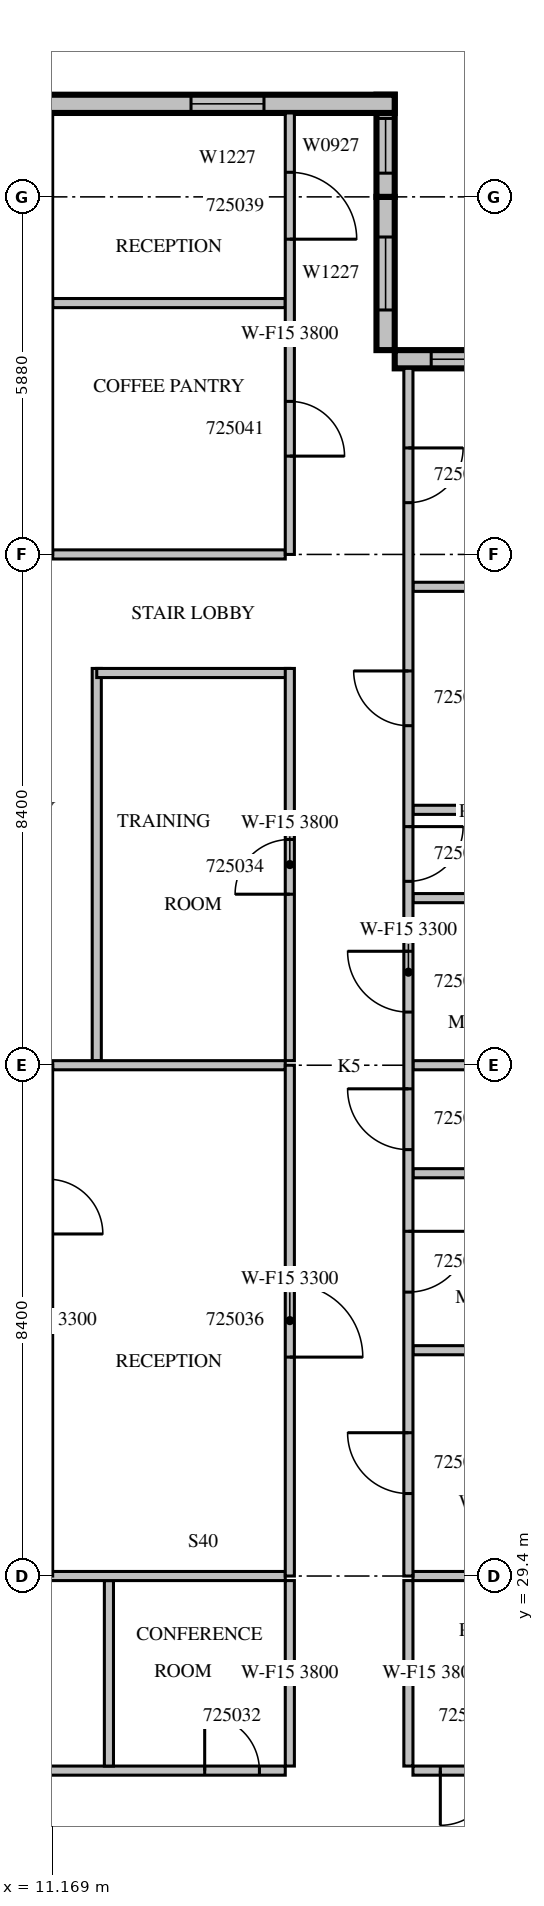
"""IFC4 building model, lengths in metres.
Left out: names, types, materials, properties, quantities, classifications, styles, units other than length and angle.
Written with IfcOpenShell. Run it as: python <this file> out.ifc"""

import sys

from ifc_helpers import new_model, si_unit, direction, frame, frame_2d, origin, place, context, subcontext, project, spatial, rectangle, extrude, source, transform, mapped, element, fill, save


model = new_model("IFC4")
c1 = context("Model", 3, precision=1e-05, world=origin(), true_north=direction((0.0, 1.0)))
c2 = subcontext(c1, "Body", "Model", "MODEL_VIEW")
j1 = project(units=[si_unit("LENGTHUNIT", "METRE"), si_unit("PLANEANGLEUNIT", "RADIAN")], contexts=[c1])
p1 = place(None, origin())
s1 = spatial("IfcSite", under=j1, at=p1, CompositionType="ELEMENT")
p2 = place(p1, origin())
s2 = spatial("IfcBuilding", under=s1, at=p2, CompositionType="ELEMENT")
p3 = place(p2, frame((0.0, 0.0, 116.1)))
s3 = spatial("IfcBuildingStorey", under=s2, at=p3, CompositionType="ELEMENT", Elevation=116.1)
m1 = source(origin(), c2, "Body", "SweptSolid", [
    extrude(rectangle(XDim=4.2, YDim=0.3, at=frame_2d((2.1, 0.0))), origin(), (0.0, 0.0, 1.0), 3.8),
])
p4 = place(p3, frame((21.0, 49.41, 0.0), z_axis=(0.0, 0.0, 1.0), x_axis=(-1.0, 0.0, 0.0)))
e1 = element("IfcWall", 1, at=p4, inside=s3, PredefinedType="STANDARD", context=c2, shape_type="MappedRepresentation", body=[
    mapped(m1, transform((0.0, 0.0, 0.0), scale=1.0)),
])
m2 = source(origin(), c2, "Body", "SweptSolid", [
    extrude(rectangle(XDim=3.0, YDim=2.7, at=frame_2d((1.5, 1.35))), frame((0.0, 0.16, 0.0), z_axis=(0.0, -1.0, 0.0), x_axis=(1.0, 0.0, 0.0)), (0.0, 0.0, 1.0), 0.32),
])
p5 = place(p4, frame((0.6, 0.0, 0.6)))
e2 = element("IfcOpeningElement", 2, at=p5, cuts=e1, PredefinedType="OPENING", context=c2, shape_type="MappedRepresentation", body=[
    mapped(m2, transform((0.0, 0.0, 0.0), scale=1.0)),
])
m3 = source(origin(), c2, "Body", "SweptSolid", [
    extrude(rectangle(XDim=2.52, YDim=0.3, at=frame_2d((1.26, 0.0))), origin(), (0.0, 0.0, 1.0), 3.8),
])
p6 = place(p3, frame((16.65, 49.56, 0.0), z_axis=(0.0, 0.0, 1.0), x_axis=(0.0, 1.0, 0.0)))
e3 = element("IfcWall", 3, at=p6, inside=s3, PredefinedType="STANDARD", context=c2, shape_type="MappedRepresentation", body=[
    mapped(m3, transform((0.0, 0.0, 0.0), scale=1.0)),
])
m4 = source(origin(), c2, "Body", "SweptSolid", [
    extrude(rectangle(XDim=1.2, YDim=2.7, at=frame_2d((0.6, 1.35))), frame((0.0, 0.16, 0.0), z_axis=(0.0, -1.0, 0.0), x_axis=(1.0, 0.0, 0.0)), (0.0, 0.0, 1.0), 0.32),
])
p7 = place(p6, frame((0.66, 0.0, 0.6)))
e4 = element("IfcOpeningElement", 4, at=p7, cuts=e3, PredefinedType="OPENING", context=c2, shape_type="MappedRepresentation", body=[
    mapped(m4, transform((0.0, 0.0, 0.0), scale=1.0)),
])
m5 = source(origin(), c2, "Body", "SweptSolid", [
    extrude(rectangle(XDim=1.68, YDim=0.3, at=frame_2d((0.84, 0.0))), origin(), (0.0, 0.0, 1.0), 3.8),
])
p8 = place(p3, frame((16.65, 52.08, 0.0), z_axis=(0.0, 0.0, 1.0), x_axis=(0.0, 1.0, 0.0)))
e5 = element("IfcWall", 5, at=p8, inside=s3, PredefinedType="STANDARD", context=c2, shape_type="MappedRepresentation", body=[
    mapped(m5, transform((0.0, 0.0, 0.0), scale=1.0)),
])
m6 = source(origin(), c2, "Body", "SweptSolid", [
    extrude(rectangle(XDim=0.9, YDim=2.7, at=frame_2d((0.45, 1.35))), frame((0.0, 0.16, 0.0), z_axis=(0.0, -1.0, 0.0), x_axis=(1.0, 0.0, 0.0)), (0.0, 0.0, 1.0), 0.32),
])
p9 = place(p8, frame((0.39, 0.0, 0.6)))
e6 = element("IfcOpeningElement", 6, at=p9, cuts=e5, PredefinedType="OPENING", context=c2, shape_type="MappedRepresentation", body=[
    mapped(m6, transform((0.0, 0.0, 0.0), scale=1.0)),
])
m7 = source(origin(), c2, "Body", "SweptSolid", [
    extrude(rectangle(XDim=10.5, YDim=0.3, at=frame_2d((5.25, 0.0))), origin(), (0.0, 0.0, 1.0), 3.8),
])
p10 = place(p3, frame((16.8, 53.61, 0.0), z_axis=(0.0, 0.0, 1.0), x_axis=(-1.0, 0.0, 0.0)))
e7 = element("IfcWall", 7, at=p10, inside=s3, PredefinedType="STANDARD", context=c2, shape_type="MappedRepresentation", body=[
    mapped(m7, transform((0.0, 0.0, 0.0), scale=1.0)),
])
p11 = place(p10, frame((2.15, 0.0, 0.6)))
e8 = element("IfcOpeningElement", 8, at=p11, cuts=e7, PredefinedType="OPENING", context=c2, shape_type="MappedRepresentation", body=[
    mapped(m4, transform((0.0, 0.0, 0.0), scale=1.0)),
])
m8 = source(origin(), c2, "Body", "SweptSolid", [
    extrude(rectangle(XDim=1.8, YDim=2.7, at=frame_2d((0.9, 1.35))), frame((0.0, 0.16, 0.0), z_axis=(0.0, -1.0, 0.0), x_axis=(1.0, 0.0, 0.0)), (0.0, 0.0, 1.0), 0.32),
])
p12 = place(p10, frame((8.025, 0.0, 0.6)))
e9 = element("IfcOpeningElement", 9, at=p12, cuts=e7, PredefinedType="OPENING", context=c2, shape_type="MappedRepresentation", body=[
    mapped(m8, transform((0.0, 0.0, 0.0), scale=1.0)),
])
m9 = source(origin(), c2, "Body", "SweptSolid", [
    extrude(rectangle(XDim=8.495, YDim=0.15, at=frame_2d((4.247, 0.0))), origin(), (0.0, 0.0, 1.0), 3.8),
])
p13 = place(p3, frame((6.505, 26.2, 0.0), z_axis=(0.0, 0.0, 1.0), x_axis=(1.0, 0.0, 0.0)))
e10 = element("IfcWall", 10, at=p13, inside=s3, PredefinedType="PARTITIONING", context=c2, shape_type="MappedRepresentation", body=[
    mapped(m9, transform((0.0, 0.0, 0.0), scale=1.0)),
])
m10 = source(origin(), c2, "Body", "SweptSolid", [
    extrude(rectangle(XDim=0.9, YDim=2.1, at=frame_2d((0.45, 1.05))), frame((0.0, 0.085, 0.0), z_axis=(0.0, -1.0, 0.0), x_axis=(1.0, 0.0, 0.0)), (0.0, 0.0, 1.0), 0.17),
])
p14 = place(p13, frame((2.095, 0.0, 0.0)))
e11 = element("IfcOpeningElement", 11, at=p14, cuts=e10, PredefinedType="OPENING", context=c2, shape_type="MappedRepresentation", body=[
    mapped(m10, transform((0.0, 0.0, 0.0), scale=1.0)),
])
p15 = place(p13, frame((7.17, 0.0, 0.0)))
e12 = element("IfcOpeningElement", 12, at=p15, cuts=e10, PredefinedType="OPENING", context=c2, shape_type="MappedRepresentation", body=[
    mapped(m10, transform((0.0, 0.0, 0.0), scale=1.0)),
])
m11 = source(origin(), c2, "Body", "SweptSolid", [
    extrude(rectangle(XDim=3.6, YDim=0.15, at=frame_2d((1.8, 0.0))), origin(), (0.0, 0.0, 1.0), 3.8),
])
p16 = place(p3, frame((17.1, 26.2, 0.0), z_axis=(0.0, 0.0, 1.0), x_axis=(1.0, 0.0, 0.0)))
e13 = element("IfcWall", 13, at=p16, inside=s3, PredefinedType="PARTITIONING", context=c2, shape_type="MappedRepresentation", body=[
    mapped(m11, transform((0.0, 0.0, 0.0), scale=1.0)),
])
p17 = place(p16, frame((0.45, 0.0, 0.0)))
e14 = element("IfcOpeningElement", 14, at=p17, cuts=e13, PredefinedType="OPENING", context=c2, shape_type="MappedRepresentation", body=[
    mapped(m10, transform((0.0, 0.0, 0.0), scale=1.0)),
])
m12 = source(origin(), c2, "Body", "SweptSolid", [
    extrude(rectangle(XDim=3.05, YDim=0.15, at=frame_2d((1.525, 0.0))), origin(), (0.0, 0.0, 1.0), 3.8),
])
for number, where, z_axis, x_axis in (
    (15, (12.1, 26.275, 0.0), (0.0, 0.0, 1.0), (0.0, 1.0, 0.0)),
    (16, (15.075, 26.275, 0.0), (0.0, 0.0, 1.0), (0.0, 1.0, 0.0)),
    (17, (17.025, 29.325, 0.0), (0.0, 0.0, 1.0), (0.0, -1.0, 0.0)),
):
    element("IfcWall", number, at=place(p3, frame(where, z_axis=z_axis, x_axis=x_axis)), inside=s3, PredefinedType="PARTITIONING", context=c2, shape_type="MappedRepresentation", body=[
        mapped(m12, transform((0.0, 0.0, 0.0), scale=1.0)),
    ])
m13 = source(origin(), c2, "Body", "SweptSolid", [
    extrude(rectangle(XDim=3.976, YDim=0.15, at=frame_2d((1.988, 0.0))), origin(), (0.0, 0.0, 1.0), 3.8),
])
p18 = place(p3, frame((15.0, 29.4, 0.0), z_axis=(0.0, 0.0, 1.0), x_axis=(-1.0, 0.0, 0.0)))
e18 = element("IfcWall", 18, at=p18, inside=s3, PredefinedType="PARTITIONING", context=c2, shape_type="MappedRepresentation", body=[
    mapped(m13, transform((0.0, 0.0, 0.0), scale=1.0)),
])
m14 = source(origin(), c2, "Body", "SweptSolid", [
    extrude(rectangle(XDim=2.851, YDim=0.15, at=frame_2d((1.425, 0.0))), origin(), (0.0, 0.0, 1.0), 3.8),
])
p19 = place(p3, frame((19.951, 29.4, 0.0), z_axis=(0.0, 0.0, 1.0), x_axis=(-1.0, 0.0, 0.0)))
e19 = element("IfcWall", 19, at=p19, inside=s3, PredefinedType="PARTITIONING", context=c2, shape_type="MappedRepresentation", body=[
    mapped(m14, transform((0.0, 0.0, 0.0), scale=1.0)),
])
m15 = source(origin(), c2, "Body", "SweptSolid", [
    extrude(rectangle(XDim=6.45, YDim=0.15, at=frame_2d((3.225, 0.0))), origin(), (0.0, 0.0, 1.0), 3.8),
])
p20 = place(p3, frame((11.9, 44.325, 0.0), z_axis=(0.0, 0.0, 1.0), x_axis=(0.0, -1.0, 0.0)))
e20 = element("IfcWall", 20, at=p20, inside=s3, PredefinedType="PARTITIONING", context=c2, shape_type="MappedRepresentation", body=[
    mapped(m15, transform((0.0, 0.0, 0.0), scale=1.0)),
])
m16 = source(origin(), c2, "Body", "SweptSolid", [
    extrude(rectangle(XDim=3.175, YDim=0.15, at=frame_2d((1.587, 0.0))), origin(), (0.0, 0.0, 1.0), 3.8),
])
p21 = place(p3, frame((15.075, 44.25, 0.0), z_axis=(0.0, 0.0, 1.0), x_axis=(-1.0, 0.0, 0.0)))
e21 = element("IfcWall", 21, at=p21, inside=s3, PredefinedType="PARTITIONING", context=c2, shape_type="MappedRepresentation", body=[
    mapped(m16, transform((0.0, 0.0, 0.0), scale=1.0)),
])
p22 = place(p3, frame((15.075, 37.875, 0.0), z_axis=(0.0, 0.0, 1.0), x_axis=(0.0, 1.0, 0.0)))
e22 = element("IfcWall", 22, at=p22, inside=s3, PredefinedType="PARTITIONING", context=c2, shape_type="MappedRepresentation", body=[
    mapped(m15, transform((0.0, 0.0, 0.0), scale=1.0)),
])
p23 = place(p22, frame((2.737, 0.0, 0.0)))
e23 = element("IfcOpeningElement", 23, at=p23, cuts=e22, PredefinedType="OPENING", context=c2, shape_type="MappedRepresentation", body=[
    mapped(m10, transform((0.0, 0.0, 0.0), scale=1.0)),
])
m17 = source(origin(), c2, "Body", "SweptSolid", [
    extrude(rectangle(XDim=3.825, YDim=0.15, at=frame_2d((1.913, 0.0))), origin(), (0.0, 0.0, 1.0), 3.8),
])
for number, where, z_axis, x_axis in (
    (24, (15.0, 37.8, 0.0), (0.0, 0.0, 1.0), (-1.0, 0.0, 0.0)),
    (25, (15.0, 50.334, 0.0), (0.0, 0.0, 1.0), (-1.0, 0.0, 0.0)),
    (26, (15.0, 46.2, 0.0), (0.0, 0.0, 1.0), (-1.0, 0.0, 0.0)),
):
    element("IfcWall", number, at=place(p3, frame(where, z_axis=z_axis, x_axis=x_axis)), inside=s3, PredefinedType="PARTITIONING", context=c2, shape_type="MappedRepresentation", body=[
        mapped(m17, transform((0.0, 0.0, 0.0), scale=1.0)),
    ])
m18 = source(origin(), c2, "Body", "SweptSolid", [
    extrude(rectangle(XDim=3.6, YDim=0.15, at=frame_2d((1.8, 0.0))), origin(), (0.0, 0.0, 1.0), 2.8),
])
for number, where, z_axis, x_axis in (
    (27, (17.1, 33.113, 0.0), (0.0, 0.0, 1.0), (1.0, 0.0, 0.0)),
    (28, (17.1, 36.024, 0.0), (0.0, 0.0, 1.0), (1.0, 0.0, 0.0)),
):
    element("IfcWall", number, at=place(p3, frame(where, z_axis=z_axis, x_axis=x_axis)), inside=s3, PredefinedType="PARTITIONING", context=c2, shape_type="MappedRepresentation", body=[
        mapped(m18, transform((0.0, 0.0, 0.0), scale=1.0)),
    ])
for number, where, z_axis, x_axis in (
    (29, (17.1, 40.548, 0.0), (0.0, 0.0, 1.0), (1.0, 0.0, 0.0)),
    (30, (17.1, 45.667, 0.0), (0.0, 0.0, 1.0), (1.0, 0.0, 0.0)),
):
    element("IfcWall", number, at=place(p3, frame(where, z_axis=z_axis, x_axis=x_axis)), inside=s3, PredefinedType="PARTITIONING", context=c2, shape_type="MappedRepresentation", body=[
        mapped(m11, transform((0.0, 0.0, 0.0), scale=1.0)),
    ])
p24 = place(p3, frame((19.951, 37.8, 0.0), z_axis=(0.0, 0.0, 1.0), x_axis=(-1.0, 0.0, 0.0)))
e31 = element("IfcWall", 31, at=p24, inside=s3, PredefinedType="PARTITIONING", context=c2, shape_type="MappedRepresentation", body=[
    mapped(m14, transform((0.0, 0.0, 0.0), scale=1.0)),
])
p25 = place(p3, frame((20.7, 42.0, 0.0), z_axis=(0.0, 0.0, 1.0), x_axis=(-1.0, 0.0, 0.0)))
e32 = element("IfcWall", 32, at=p25, inside=s3, PredefinedType="PARTITIONING", context=c2, shape_type="MappedRepresentation", body=[
    mapped(m11, transform((0.0, 0.0, 0.0), scale=1.0)),
])
m19 = source(origin(), c2, "Body", "SweptSolid", [
    extrude(rectangle(XDim=8.4, YDim=0.15, at=frame_2d((4.2, 0.0))), origin(), (0.0, 0.0, 1.0), 3.3),
])
p26 = place(p3, frame((15.075, 29.4, 0.0), z_axis=(0.0, 0.0, 1.0), x_axis=(0.0, 1.0, 0.0)))
e33 = element("IfcWall", 33, at=p26, inside=s3, PredefinedType="PARTITIONING", context=c2, shape_type="MappedRepresentation", body=[
    mapped(m19, transform((0.0, 0.0, 0.0), scale=1.0)),
])
m20 = source(origin(), c2, "Body", "SweptSolid", [
    extrude(rectangle(XDim=1.2, YDim=2.1, at=frame_2d((0.6, 1.05))), frame((0.0, 0.085, 0.0), z_axis=(0.0, -1.0, 0.0), x_axis=(1.0, 0.0, 0.0)), (0.0, 0.0, 1.0), 0.17),
])
p27 = place(p26, frame((3.6, 0.0, 0.0)))
e34 = element("IfcOpeningElement", 34, at=p27, cuts=e33, PredefinedType="OPENING", context=c2, shape_type="MappedRepresentation", body=[
    mapped(m20, transform((0.0, 0.0, 0.0), scale=1.0)),
])
m21 = source(origin(), c2, "Body", "SweptSolid", [
    extrude(rectangle(XDim=7.26, YDim=0.15, at=frame_2d((3.63, 0.0))), origin(), (0.0, 0.0, 1.0), 3.8),
])
p28 = place(p3, frame((15.075, 46.2, 0.0), z_axis=(0.0, 0.0, 1.0), x_axis=(0.0, 1.0, 0.0)))
e35 = element("IfcWall", 35, at=p28, inside=s3, PredefinedType="PARTITIONING", context=c2, shape_type="MappedRepresentation", body=[
    mapped(m21, transform((0.0, 0.0, 0.0), scale=1.0)),
])
m22 = source(origin(), c2, "Body", "SweptSolid", [
    extrude(rectangle(XDim=1.1, YDim=2.1, at=frame_2d((0.55, 1.05))), frame((0.0, 0.085, 0.0), z_axis=(0.0, -1.0, 0.0), x_axis=(1.0, 0.0, 0.0)), (0.0, 0.0, 1.0), 0.17),
])
p29 = place(p28, frame((5.184, 0.0, 0.0)))
e36 = element("IfcOpeningElement", 36, at=p29, cuts=e35, PredefinedType="OPENING", context=c2, shape_type="MappedRepresentation", body=[
    mapped(m22, transform((0.0, 0.0, 0.0), scale=1.0)),
])
p30 = place(p28, frame((1.617, 0.0, 0.0)))
e37 = element("IfcOpeningElement", 37, at=p30, cuts=e35, PredefinedType="OPENING", context=c2, shape_type="MappedRepresentation", body=[
    mapped(m10, transform((0.0, 0.0, 0.0), scale=1.0)),
])
m23 = source(origin(), c2, "Body", "SweptSolid", [
    extrude(rectangle(XDim=19.86, YDim=0.15, at=frame_2d((9.93, 0.0))), origin(), (0.0, 0.0, 1.0), 3.3),
])
p31 = place(p3, frame((17.025, 49.26, 0.0), z_axis=(0.0, 0.0, 1.0), x_axis=(0.0, -1.0, 0.0)))
e38 = element("IfcWall", 38, at=p31, inside=s3, PredefinedType="PARTITIONING", context=c2, shape_type="MappedRepresentation", body=[
    mapped(m23, transform((0.0, 0.0, 0.0), scale=1.0)),
])
m24 = source(origin(), c2, "Body", "SweptSolid", [
    extrude(rectangle(XDim=1.0, YDim=2.1, at=frame_2d((0.5, 1.05))), frame((0.0, 0.085, 0.0), z_axis=(0.0, -1.0, 0.0), x_axis=(1.0, 0.0, 0.0)), (0.0, 0.0, 1.0), 0.17),
])
p32 = place(p31, frame((17.503, 0.0, 0.0)))
e39 = element("IfcOpeningElement", 39, at=p32, cuts=e38, PredefinedType="OPENING", context=c2, shape_type="MappedRepresentation", body=[
    mapped(m24, transform((0.0, 0.0, 0.0), scale=1.0)),
])
p33 = place(p31, frame((14.191, 0.0, 0.0)))
e40 = element("IfcOpeningElement", 40, at=p33, cuts=e38, PredefinedType="OPENING", context=c2, shape_type="MappedRepresentation", body=[
    mapped(m24, transform((0.0, 0.0, 0.0), scale=1.0)),
])
p34 = place(p31, frame((11.848, 0.0, 0.0)))
e41 = element("IfcOpeningElement", 41, at=p34, cuts=e38, PredefinedType="OPENING", context=c2, shape_type="MappedRepresentation", body=[
    mapped(m24, transform((0.0, 0.0, 0.0), scale=1.0)),
])
p35 = place(p31, frame((9.586, 0.0, 0.0)))
e42 = element("IfcOpeningElement", 42, at=p35, cuts=e38, PredefinedType="OPENING", context=c2, shape_type="MappedRepresentation", body=[
    mapped(m24, transform((0.0, 0.0, 0.0), scale=1.0)),
])
p36 = place(p31, frame((7.536, 0.0, 0.0)))
e43 = element("IfcOpeningElement", 43, at=p36, cuts=e38, PredefinedType="OPENING", context=c2, shape_type="MappedRepresentation", body=[
    mapped(m10, transform((0.0, 0.0, 0.0), scale=1.0)),
])
p37 = place(p31, frame((4.976, 0.0, 0.0)))
e44 = element("IfcOpeningElement", 44, at=p37, cuts=e38, PredefinedType="OPENING", context=c2, shape_type="MappedRepresentation", body=[
    mapped(m10, transform((0.0, 0.0, 0.0), scale=1.0)),
])
p38 = place(p31, frame((1.309, 0.0, 0.0)))
e45 = element("IfcOpeningElement", 45, at=p38, cuts=e38, PredefinedType="OPENING", context=c2, shape_type="MappedRepresentation", body=[
    mapped(m10, transform((0.0, 0.0, 0.0), scale=1.0)),
])
m25 = source(origin(), c2, "Body", "SweptSolid", [
    extrude(rectangle(XDim=3.0, YDim=2.7, at=frame_2d((1.5, 1.35))), frame((0.0, 0.03, 0.0), z_axis=(0.0, -1.0, 0.0), x_axis=(1.0, 0.0, 0.0)), (0.0, 0.0, 1.0), 0.06),
])
p39 = place(p5, origin())
e46 = element("IfcWindow", 46, at=p39, inside=s3, PartitioningType="SINGLE_PANEL", PredefinedType="WINDOW", context=c2, shape_type="MappedRepresentation", body=[
    mapped(m25, transform((0.0, 0.0, 0.0), scale=1.0)),
])
fill(e2, e46)
m26 = source(origin(), c2, "Body", "SweptSolid", [
    extrude(rectangle(XDim=1.2, YDim=2.7, at=frame_2d((0.6, 1.35))), frame((0.0, 0.03, 0.0), z_axis=(0.0, -1.0, 0.0), x_axis=(1.0, 0.0, 0.0)), (0.0, 0.0, 1.0), 0.06),
])
p40 = place(p7, origin())
e47 = element("IfcWindow", 47, at=p40, inside=s3, PartitioningType="SINGLE_PANEL", PredefinedType="WINDOW", context=c2, shape_type="MappedRepresentation", body=[
    mapped(m26, transform((0.0, 0.0, 0.0), scale=1.0)),
])
fill(e4, e47)
m27 = source(origin(), c2, "Body", "SweptSolid", [
    extrude(rectangle(XDim=0.9, YDim=2.7, at=frame_2d((0.45, 1.35))), frame((0.0, 0.03, 0.0), z_axis=(0.0, -1.0, 0.0), x_axis=(1.0, 0.0, 0.0)), (0.0, 0.0, 1.0), 0.06),
])
p41 = place(p9, origin())
e48 = element("IfcWindow", 48, at=p41, inside=s3, PartitioningType="SINGLE_PANEL", PredefinedType="WINDOW", context=c2, shape_type="MappedRepresentation", body=[
    mapped(m27, transform((0.0, 0.0, 0.0), scale=1.0)),
])
fill(e6, e48)
p42 = place(p11, origin())
e49 = element("IfcWindow", 49, at=p42, inside=s3, PartitioningType="SINGLE_PANEL", PredefinedType="WINDOW", context=c2, shape_type="MappedRepresentation", body=[
    mapped(m26, transform((0.0, 0.0, 0.0), scale=1.0)),
])
fill(e8, e49)
m28 = source(origin(), c2, "Body", "SweptSolid", [
    extrude(rectangle(XDim=0.9, YDim=2.1, at=frame_2d((0.45, 1.05))), frame((0.0, 0.025, 0.0), z_axis=(0.0, -1.0, 0.0), x_axis=(1.0, 0.0, 0.0)), (0.0, 0.0, 1.0), 0.05),
])
p43 = place(p15, origin())
e50 = element("IfcDoor", 50, at=p43, inside=s3, OperationType="SINGLE_SWING_LEFT", PredefinedType="DOOR", context=c2, shape_type="MappedRepresentation", body=[
    mapped(m28, transform((0.0, 0.0, 0.0), scale=1.0)),
])
fill(e12, e50)
p44 = place(p17, origin())
e51 = element("IfcDoor", 51, at=p44, inside=s3, OperationType="SINGLE_SWING_RIGHT", PredefinedType="DOOR", context=c2, shape_type="MappedRepresentation", body=[
    mapped(m28, transform((0.0, 0.0, 0.0), scale=1.0)),
])
fill(e14, e51)
p45 = place(p23, origin())
e52 = element("IfcDoor", 52, at=p45, inside=s3, OperationType="SINGLE_SWING_LEFT", PredefinedType="DOOR", context=c2, shape_type="MappedRepresentation", body=[
    mapped(m28, transform((0.0, 0.0, 0.0), scale=1.0)),
])
fill(e23, e52)
m29 = source(origin(), c2, "Body", "SweptSolid", [
    extrude(rectangle(XDim=1.2, YDim=2.1, at=frame_2d((0.6, 1.05))), frame((0.0, 0.025, 0.0), z_axis=(0.0, -1.0, 0.0), x_axis=(1.0, 0.0, 0.0)), (0.0, 0.0, 1.0), 0.05),
])
p46 = place(p27, origin())
e53 = element("IfcDoor", 53, at=p46, inside=s3, OperationType="SINGLE_SWING_RIGHT", PredefinedType="DOOR", context=c2, shape_type="MappedRepresentation", body=[
    mapped(m29, transform((0.0, 0.0, 0.0), scale=1.0)),
])
fill(e34, e53)
m30 = source(origin(), c2, "Body", "SweptSolid", [
    extrude(rectangle(XDim=1.1, YDim=2.1, at=frame_2d((0.55, 1.05))), frame((0.0, 0.025, 0.0), z_axis=(0.0, -1.0, 0.0), x_axis=(1.0, 0.0, 0.0)), (0.0, 0.0, 1.0), 0.05),
])
p47 = place(p29, origin())
e54 = element("IfcDoor", 54, at=p47, inside=s3, OperationType="SINGLE_SWING_RIGHT", PredefinedType="DOOR", context=c2, shape_type="MappedRepresentation", body=[
    mapped(m30, transform((0.0, 0.0, 0.0), scale=1.0)),
])
fill(e36, e54)
p48 = place(p30, origin())
e55 = element("IfcDoor", 55, at=p48, inside=s3, OperationType="SINGLE_SWING_RIGHT", PredefinedType="DOOR", context=c2, shape_type="MappedRepresentation", body=[
    mapped(m28, transform((0.0, 0.0, 0.0), scale=1.0)),
])
fill(e37, e55)
m31 = source(origin(), c2, "Body", "SweptSolid", [
    extrude(rectangle(XDim=1.0, YDim=2.1, at=frame_2d((0.5, 1.05))), frame((0.0, 0.025, 0.0), z_axis=(0.0, -1.0, 0.0), x_axis=(1.0, 0.0, 0.0)), (0.0, 0.0, 1.0), 0.05),
])
p49 = place(p32, origin())
e56 = element("IfcDoor", 56, at=p49, inside=s3, OperationType="SINGLE_SWING_RIGHT", PredefinedType="DOOR", context=c2, shape_type="MappedRepresentation", body=[
    mapped(m31, transform((0.0, 0.0, 0.0), scale=1.0)),
])
fill(e39, e56)
p50 = place(p33, origin())
e57 = element("IfcDoor", 57, at=p50, inside=s3, OperationType="SINGLE_SWING_LEFT", PredefinedType="DOOR", context=c2, shape_type="MappedRepresentation", body=[
    mapped(m31, transform((0.0, 0.0, 0.0), scale=1.0)),
])
fill(e40, e57)
p51 = place(p34, origin())
e58 = element("IfcDoor", 58, at=p51, inside=s3, OperationType="SINGLE_SWING_RIGHT", PredefinedType="DOOR", context=c2, shape_type="MappedRepresentation", body=[
    mapped(m31, transform((0.0, 0.0, 0.0), scale=1.0)),
])
fill(e41, e58)
p52 = place(p35, origin())
e59 = element("IfcDoor", 59, at=p52, inside=s3, OperationType="SINGLE_SWING_RIGHT", PredefinedType="DOOR", context=c2, shape_type="MappedRepresentation", body=[
    mapped(m31, transform((0.0, 0.0, 0.0), scale=1.0)),
])
fill(e42, e59)
p53 = place(p36, origin())
e60 = element("IfcDoor", 60, at=p53, inside=s3, OperationType="SINGLE_SWING_LEFT", PredefinedType="DOOR", context=c2, shape_type="MappedRepresentation", body=[
    mapped(m28, transform((0.0, 0.0, 0.0), scale=1.0)),
])
fill(e43, e60)
p54 = place(p37, origin())
e61 = element("IfcDoor", 61, at=p54, inside=s3, OperationType="SINGLE_SWING_RIGHT", PredefinedType="DOOR", context=c2, shape_type="MappedRepresentation", body=[
    mapped(m28, transform((0.0, 0.0, 0.0), scale=1.0)),
])
fill(e44, e61)
p55 = place(p38, origin())
e62 = element("IfcDoor", 62, at=p55, inside=s3, OperationType="SINGLE_SWING_LEFT", PredefinedType="DOOR", context=c2, shape_type="MappedRepresentation", body=[
    mapped(m28, transform((0.0, 0.0, 0.0), scale=1.0)),
])
fill(e45, e62)
save(model, sys.argv[1])
